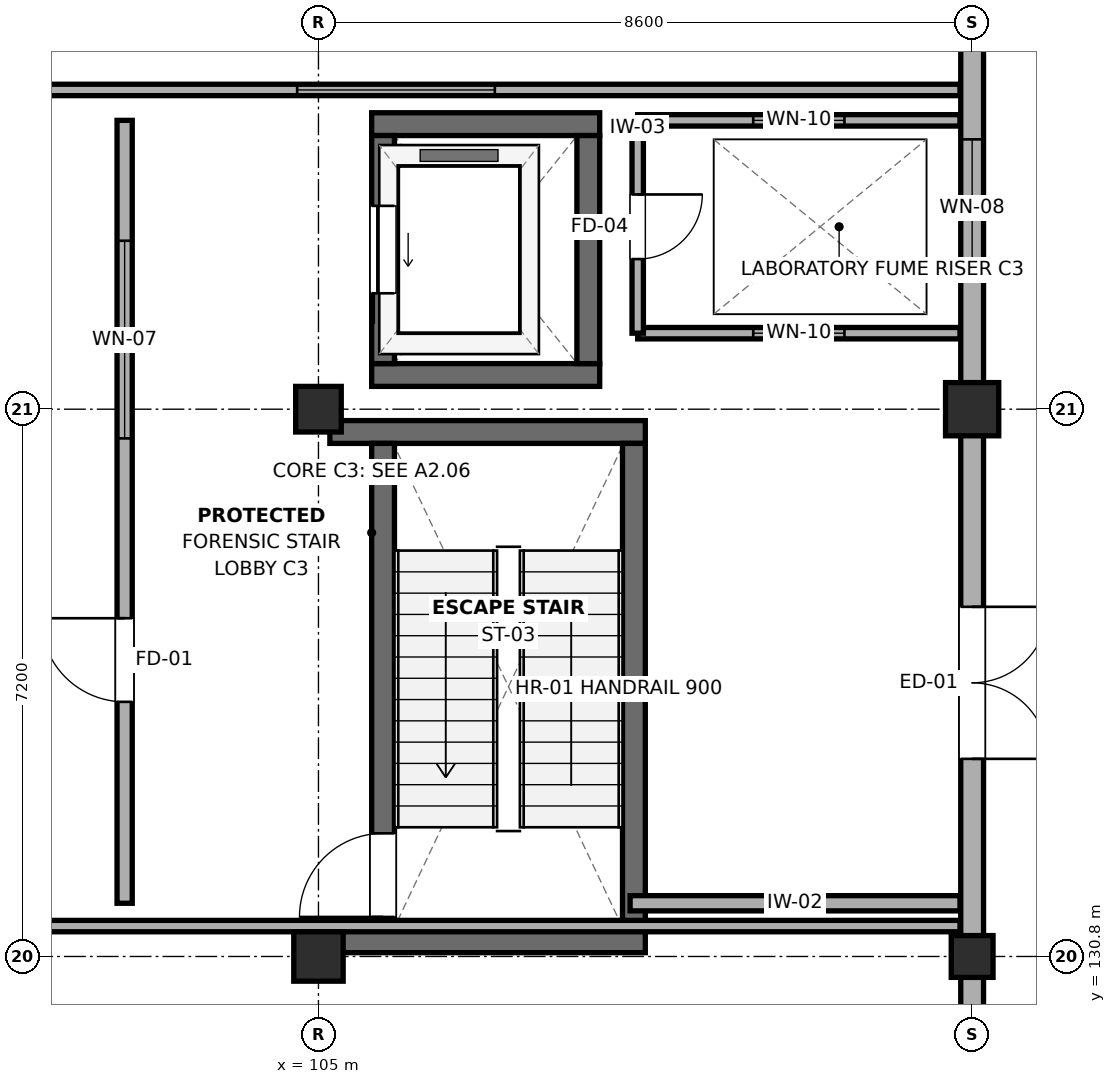
"""IFC4 building model, lengths in metres.
Left out: names, types, materials, properties, quantities, classifications, styles, units other than length and angle.
Written with IfcOpenShell. Run it as: python <this file> out.ifc"""

import sys

from ifc_helpers import new_model, si_unit, direction, frame, frame_2d, origin, origin_2d, place, context, subcontext, project, spatial, rectangle, extrude, element, fill, save


model = new_model("IFC4")
c1 = context("Model", 3, precision=1e-05, world=origin(), true_north=direction((0.0, 1.0)))
c2 = subcontext(c1, "Body", "Model", "MODEL_VIEW")
j1 = project(units=[si_unit("LENGTHUNIT", "METRE"), si_unit("PLANEANGLEUNIT", "RADIAN")], contexts=[c1])
p1 = place(None, origin())
s1 = spatial("IfcSite", under=j1, at=p1, CompositionType="ELEMENT")
p2 = place(p1, origin())
s2 = spatial("IfcBuilding", under=s1, at=p2, CompositionType="ELEMENT")
p3 = place(p2, origin())
s3 = spatial("IfcBuildingStorey", under=s2, at=p3, CompositionType="ELEMENT", Elevation=0.0)
p4 = place(p3, frame((105.0, 130.8, 0.0), z_axis=(0.0, 0.0, 1.0), x_axis=(1.0, 0.0, 0.0)))
e1 = element("IfcColumn", 1, at=p4, inside=s3, PredefinedType="COLUMN", context=c2, shape_type="SweptSolid", body=[
    extrude(rectangle(XDim=0.65, YDim=0.65, at=origin_2d()), origin(), (0.0, 0.0, 1.0), 4.8),
])
p5 = place(p3, frame((105.0, 138.0, 0.0), z_axis=(0.0, 0.0, 1.0), x_axis=(1.0, 0.0, 0.0)))
e2 = element("IfcColumn", 2, at=p5, inside=s3, PredefinedType="COLUMN", context=c2, shape_type="SweptSolid", body=[
    extrude(rectangle(XDim=0.6, YDim=0.6, at=origin_2d()), origin(), (0.0, 0.0, 1.0), 4.8),
])
p6 = place(p3, frame((113.6, 130.8, 0.0), z_axis=(0.0, 0.0, 1.0), x_axis=(1.0, 0.0, 0.0)))
e3 = element("IfcColumn", 3, at=p6, inside=s3, PredefinedType="COLUMN", context=c2, shape_type="SweptSolid", body=[
    extrude(rectangle(XDim=0.55, YDim=0.55, at=origin_2d()), origin(), (0.0, 0.0, 1.0), 4.8),
])
p7 = place(p3, frame((113.6, 138.0, 0.0), z_axis=(0.0, 0.0, 1.0), x_axis=(1.0, 0.0, 0.0)))
e4 = element("IfcColumn", 4, at=p7, inside=s3, PredefinedType="COLUMN", context=c2, shape_type="SweptSolid", body=[
    extrude(rectangle(XDim=0.7, YDim=0.7, at=origin_2d()), origin(), (0.0, 0.0, 1.0), 4.8),
])
for number, where, z_axis, x_axis in (
    (5, (105.15, 131.0, 0.0), (0.0, 0.0, 1.0), (1.0, 0.0, 0.0)),
    (6, (105.15, 137.7, 0.0), (0.0, 0.0, 1.0), (1.0, 0.0, 0.0)),
):
    element("IfcWall", number, at=place(p3, frame(where, z_axis=z_axis, x_axis=x_axis)), inside=s3, PredefinedType="SHEAR", context=c2, shape_type="SweptSolid", body=[
        extrude(rectangle(XDim=4.15, YDim=0.3, at=frame_2d((2.075, 0.0))), origin(), (0.0, 0.0, 1.0), 4.56),
    ])
p8 = place(p3, frame((105.85, 131.15, 0.0), z_axis=(0.0, 0.0, 1.0), x_axis=(0.0, 1.0, 0.0)))
e7 = element("IfcWall", 7, at=p8, inside=s3, PredefinedType="SHEAR", context=c2, shape_type="SweptSolid", body=[
    extrude(rectangle(XDim=6.4, YDim=0.3, at=frame_2d((3.2, 0.0))), origin(), (0.0, 0.0, 1.0), 4.56),
])
p9 = place(p8, frame((0.17, 0.0, 0.0)))
e8 = element("IfcOpeningElement", 8, at=p9, cuts=e7, PredefinedType="OPENING", context=c2, shape_type="SweptSolid", body=[
    extrude(rectangle(XDim=1.1, YDim=2.15, at=frame_2d((0.55, 1.075))), frame((0.0, 0.165, 0.0), z_axis=(0.0, -1.0, 0.0), x_axis=(1.0, 0.0, 0.0)), (0.0, 0.0, 1.0), 0.33),
])
p10 = place(p3, frame((109.15, 131.15, 0.0), z_axis=(0.0, 0.0, 1.0), x_axis=(0.0, 1.0, 0.0)))
e9 = element("IfcWall", 9, at=p10, inside=s3, PredefinedType="SHEAR", context=c2, shape_type="SweptSolid", body=[
    extrude(rectangle(XDim=6.4, YDim=0.3, at=frame_2d((3.2, 0.0))), origin(), (0.0, 0.0, 1.0), 4.56),
])
for number, where, z_axis, x_axis in (
    (10, (105.7, 138.45, 0.0), (0.0, 0.0, 1.0), (1.0, 0.0, 0.0)),
    (11, (105.7, 141.75, 0.0), (0.0, 0.0, 1.0), (1.0, 0.0, 0.0)),
):
    element("IfcWall", number, at=place(p3, frame(where, z_axis=z_axis, x_axis=x_axis)), inside=s3, PredefinedType="SHEAR", context=c2, shape_type="SweptSolid", body=[
        extrude(rectangle(XDim=3.0, YDim=0.3, at=frame_2d((1.5, 0.0))), origin(), (0.0, 0.0, 1.0), 4.56),
    ])
p11 = place(p3, frame((105.85, 138.6, 0.0), z_axis=(0.0, 0.0, 1.0), x_axis=(0.0, 1.0, 0.0)))
e12 = element("IfcWall", 12, at=p11, inside=s3, PredefinedType="SHEAR", context=c2, shape_type="SweptSolid", body=[
    extrude(rectangle(XDim=3.0, YDim=0.3, at=frame_2d((1.5, 0.0))), origin(), (0.0, 0.0, 1.0), 4.56),
])
p12 = place(p11, frame((0.925, 0.0, 0.0)))
e13 = element("IfcOpeningElement", 13, at=p12, cuts=e12, PredefinedType="OPENING", context=c2, shape_type="SweptSolid", body=[
    extrude(rectangle(XDim=1.15, YDim=2.15, at=frame_2d((0.575, 1.075))), frame((0.0, 0.165, 0.0), z_axis=(0.0, -1.0, 0.0), x_axis=(1.0, 0.0, 0.0)), (0.0, 0.0, 1.0), 0.33),
])
p13 = place(p3, frame((108.55, 138.6, 0.0), z_axis=(0.0, 0.0, 1.0), x_axis=(0.0, 1.0, 0.0)))
e14 = element("IfcWall", 14, at=p13, inside=s3, PredefinedType="SHEAR", context=c2, shape_type="SweptSolid", body=[
    extrude(rectangle(XDim=3.0, YDim=0.3, at=frame_2d((1.5, 0.0))), origin(), (0.0, 0.0, 1.0), 4.56),
])
p14 = place(p3, frame((113.6, 122.4, 0.0), z_axis=(0.0, 0.0, 1.0), x_axis=(0.0, 1.0, 0.0)))
e15 = element("IfcWall", 15, at=p14, inside=s3, PredefinedType="SOLIDWALL", context=c2, shape_type="SweptSolid", body=[
    extrude(rectangle(XDim=8.4, YDim=0.3, at=frame_2d((4.2, 0.0))), origin(), (0.0, 0.0, 1.0), 3.965),
])
p15 = place(p14, frame((1.352, 0.0, 1.1)))
e16 = element("IfcOpeningElement", 16, at=p15, cuts=e15, PredefinedType="OPENING", context=c2, shape_type="SweptSolid", body=[
    extrude(rectangle(XDim=2.0, YDim=1.8, at=frame_2d((1.0, 0.9))), frame((0.0, 0.165, 0.0), z_axis=(0.0, -1.0, 0.0), x_axis=(1.0, 0.0, 0.0)), (0.0, 0.0, 1.0), 0.33),
])
p16 = place(p14, frame((5.048, 0.0, 1.1)))
e17 = element("IfcOpeningElement", 17, at=p16, cuts=e15, PredefinedType="OPENING", context=c2, shape_type="SweptSolid", body=[
    extrude(rectangle(XDim=2.0, YDim=1.8, at=frame_2d((1.0, 0.9))), frame((0.0, 0.165, 0.0), z_axis=(0.0, -1.0, 0.0), x_axis=(1.0, 0.0, 0.0)), (0.0, 0.0, 1.0), 0.33),
])
p17 = place(p3, frame((113.6, 130.8, 0.0), z_axis=(0.0, 0.0, 1.0), x_axis=(0.0, 1.0, 0.0)))
e18 = element("IfcWall", 18, at=p17, inside=s3, PredefinedType="SOLIDWALL", context=c2, shape_type="SweptSolid", body=[
    extrude(rectangle(XDim=7.2, YDim=0.3, at=frame_2d((3.6, 0.0))), origin(), (0.0, 0.0, 1.0), 3.965),
])
p18 = place(p17, frame((2.6, 0.0, 0.0)))
e19 = element("IfcOpeningElement", 19, at=p18, cuts=e18, PredefinedType="OPENING", context=c2, shape_type="SweptSolid", body=[
    extrude(rectangle(XDim=2.0, YDim=2.25, at=frame_2d((1.0, 1.125))), frame((0.0, 0.165, 0.0), z_axis=(0.0, -1.0, 0.0), x_axis=(1.0, 0.0, 0.0)), (0.0, 0.0, 1.0), 0.33),
])
p19 = place(p3, frame((113.6, 138.0, 0.0), z_axis=(0.0, 0.0, 1.0), x_axis=(0.0, 1.0, 0.0)))
e20 = element("IfcWall", 20, at=p19, inside=s3, PredefinedType="SOLIDWALL", context=c2, shape_type="SweptSolid", body=[
    extrude(rectangle(XDim=7.2, YDim=0.3, at=frame_2d((3.6, 0.0))), origin(), (0.0, 0.0, 1.0), 3.955),
])
p20 = place(p19, frame((1.75, 0.0, 1.1)))
e21 = element("IfcOpeningElement", 21, at=p20, cuts=e20, PredefinedType="OPENING", context=c2, shape_type="SweptSolid", body=[
    extrude(rectangle(XDim=1.8, YDim=1.2, at=frame_2d((0.9, 0.6))), frame((0.0, 0.165, 0.0), z_axis=(0.0, -1.0, 0.0), x_axis=(1.0, 0.0, 0.0)), (0.0, 0.0, 1.0), 0.33),
])
p21 = place(p3, frame((102.45, 131.5, 0.0), z_axis=(0.0, 0.0, 1.0), x_axis=(0.0, 1.0, 0.0)))
e22 = element("IfcWall", 22, at=p21, inside=s3, PredefinedType="PARTITIONING", context=c2, shape_type="SweptSolid", body=[
    extrude(rectangle(XDim=10.3, YDim=0.2, at=frame_2d((5.15, 0.0))), origin(), (0.0, 0.0, 1.0), 4.205),
])
p22 = place(p21, frame((2.65, 0.0, 0.0)))
e23 = element("IfcOpeningElement", 23, at=p22, cuts=e22, PredefinedType="OPENING", context=c2, shape_type="SweptSolid", body=[
    extrude(rectangle(XDim=1.1, YDim=2.15, at=frame_2d((0.55, 1.075))), frame((0.0, 0.115, 0.0), z_axis=(0.0, -1.0, 0.0), x_axis=(1.0, 0.0, 0.0)), (0.0, 0.0, 1.0), 0.23),
])
p23 = place(p21, frame((6.116, 0.0, 0.95)))
e24 = element("IfcOpeningElement", 24, at=p23, cuts=e22, PredefinedType="OPENING", context=c2, shape_type="SweptSolid", body=[
    extrude(rectangle(XDim=2.6, YDim=1.5, at=frame_2d((1.3, 0.75))), frame((0.0, 0.115, 0.0), z_axis=(0.0, -1.0, 0.0), x_axis=(1.0, 0.0, 0.0)), (0.0, 0.0, 1.0), 0.23),
])
p24 = place(p3, frame((109.1, 131.5, 0.0), z_axis=(0.0, 0.0, 1.0), x_axis=(1.0, 0.0, 0.0)))
e25 = element("IfcWall", 25, at=p24, inside=s3, PredefinedType="PARTITIONING", context=c2, shape_type="SweptSolid", body=[
    extrude(rectangle(XDim=4.34, YDim=0.2, at=frame_2d((2.17, 0.0))), origin(), (0.0, 0.0, 1.0), 4.225),
])
p25 = place(p3, frame((109.2, 139.0, 0.0), z_axis=(0.0, 0.0, 1.0), x_axis=(1.0, 0.0, 0.0)))
e26 = element("IfcWall", 26, at=p25, inside=s3, PredefinedType="PARTITIONING", context=c2, shape_type="SweptSolid", body=[
    extrude(rectangle(XDim=4.24, YDim=0.15, at=frame_2d((2.12, 0.0))), origin(), (0.0, 0.0, 1.0), 3.955),
])
p26 = place(p25, frame((1.52, 0.0, 0.95)))
e27 = element("IfcOpeningElement", 27, at=p26, cuts=e26, PredefinedType="OPENING", context=c2, shape_type="SweptSolid", body=[
    extrude(rectangle(XDim=1.2, YDim=1.5, at=frame_2d((0.6, 0.75))), frame((0.0, 0.09, 0.0), z_axis=(0.0, -1.0, 0.0), x_axis=(1.0, 0.0, 0.0)), (0.0, 0.0, 1.0), 0.18),
])
p27 = place(p3, frame((109.2, 141.8, 0.0), z_axis=(0.0, 0.0, 1.0), x_axis=(1.0, 0.0, 0.0)))
e28 = element("IfcWall", 28, at=p27, inside=s3, PredefinedType="PARTITIONING", context=c2, shape_type="SweptSolid", body=[
    extrude(rectangle(XDim=4.24, YDim=0.15, at=frame_2d((2.12, 0.0))), origin(), (0.0, 0.0, 1.0), 3.955),
])
p28 = place(p27, frame((1.52, 0.0, 0.95)))
e29 = element("IfcOpeningElement", 29, at=p28, cuts=e28, PredefinedType="OPENING", context=c2, shape_type="SweptSolid", body=[
    extrude(rectangle(XDim=1.2, YDim=1.5, at=frame_2d((0.6, 0.75))), frame((0.0, 0.09, 0.0), z_axis=(0.0, -1.0, 0.0), x_axis=(1.0, 0.0, 0.0)), (0.0, 0.0, 1.0), 0.18),
])
p29 = place(p3, frame((109.2, 139.0, 0.0), z_axis=(0.0, 0.0, 1.0), x_axis=(0.0, 1.0, 0.0)))
e30 = element("IfcWall", 30, at=p29, inside=s3, PredefinedType="PARTITIONING", context=c2, shape_type="SweptSolid", body=[
    extrude(rectangle(XDim=2.8, YDim=0.15, at=frame_2d((1.4, 0.0))), origin(), (0.0, 0.0, 1.0), 4.555),
])
p30 = place(p29, frame((0.975, 0.0, 0.0)))
e31 = element("IfcOpeningElement", 31, at=p30, cuts=e30, PredefinedType="OPENING", context=c2, shape_type="SweptSolid", body=[
    extrude(rectangle(XDim=0.85, YDim=2.1, at=frame_2d((0.425, 1.05))), frame((0.0, 0.09, 0.0), z_axis=(0.0, -1.0, 0.0), x_axis=(1.0, 0.0, 0.0)), (0.0, 0.0, 1.0), 0.18),
])
p31 = place(p3, frame((98.6, 131.2, 0.0), z_axis=(0.0, 0.0, 1.0), x_axis=(1.0, 0.0, 0.0)))
e32 = element("IfcWall", 32, at=p31, inside=s3, PredefinedType="PARTITIONING", context=c2, shape_type="SweptSolid", body=[
    extrude(rectangle(XDim=14.84, YDim=0.15, at=frame_2d((7.42, 0.0))), origin(), (0.0, 0.0, 1.0), 4.055),
])
p32 = place(p3, frame((98.6, 142.2, 0.0), z_axis=(0.0, 0.0, 1.0), x_axis=(1.0, 0.0, 0.0)))
e33 = element("IfcWall", 33, at=p32, inside=s3, PredefinedType="PARTITIONING", context=c2, shape_type="SweptSolid", body=[
    extrude(rectangle(XDim=14.84, YDim=0.15, at=frame_2d((7.42, 0.0))), origin(), (0.0, 0.0, 1.0), 3.955),
])
p33 = place(p32, frame((6.12, 0.0, 0.95)))
e34 = element("IfcOpeningElement", 34, at=p33, cuts=e33, PredefinedType="OPENING", context=c2, shape_type="SweptSolid", body=[
    extrude(rectangle(XDim=2.6, YDim=1.5, at=frame_2d((1.3, 0.75))), frame((0.0, 0.09, 0.0), z_axis=(0.0, -1.0, 0.0), x_axis=(1.0, 0.0, 0.0)), (0.0, 0.0, 1.0), 0.18),
])
p34 = place(p18, frame((2.0, 0.0, 0.0), z_axis=(0.0, 0.0, 1.0), x_axis=(-1.0, 0.0, 0.0)))
e35 = element("IfcDoor", 35, at=p34, inside=s3, OperationType="DOUBLE_DOOR_SINGLE_SWING", PredefinedType="DOOR", context=c2, shape_type="SweptSolid", body=[
    extrude(rectangle(XDim=2.0, YDim=2.25, at=frame_2d((1.0, 1.125))), frame((0.0, 0.025, 0.0), z_axis=(0.0, -1.0, 0.0), x_axis=(1.0, 0.0, 0.0)), (0.0, 0.0, 1.0), 0.05),
])
fill(e19, e35)
p35 = place(p20, origin())
e36 = element("IfcWindow", 36, at=p35, inside=s3, PartitioningType="SINGLE_PANEL", PredefinedType="WINDOW", context=c2, shape_type="SweptSolid", body=[
    extrude(rectangle(XDim=1.8, YDim=1.2, at=frame_2d((0.9, 0.6))), frame((0.0, 0.03, 0.0), z_axis=(0.0, -1.0, 0.0), x_axis=(1.0, 0.0, 0.0)), (0.0, 0.0, 1.0), 0.06),
])
fill(e21, e36)
p36 = place(p9, origin())
e37 = element("IfcDoor", 37, at=p36, inside=s3, OperationType="SINGLE_SWING_LEFT", PredefinedType="DOOR", context=c2, shape_type="SweptSolid", body=[
    extrude(rectangle(XDim=1.1, YDim=2.15, at=frame_2d((0.55, 1.075))), frame((0.0, 0.025, 0.0), z_axis=(0.0, -1.0, 0.0), x_axis=(1.0, 0.0, 0.0)), (0.0, 0.0, 1.0), 0.05),
])
fill(e8, e37)
p37 = place(p12, origin())
e38 = element("IfcDoor", 38, at=p37, inside=s3, OperationType="SLIDING_TO_LEFT", PredefinedType="DOOR", context=c2, shape_type="SweptSolid", body=[
    extrude(rectangle(XDim=1.15, YDim=2.15, at=frame_2d((0.575, 1.075))), frame((0.0, 0.025, 0.0), z_axis=(0.0, -1.0, 0.0), x_axis=(1.0, 0.0, 0.0)), (0.0, 0.0, 1.0), 0.05),
])
fill(e13, e38)
p38 = place(p22, origin())
e39 = element("IfcDoor", 39, at=p38, inside=s3, OperationType="SINGLE_SWING_RIGHT", PredefinedType="DOOR", context=c2, shape_type="SweptSolid", body=[
    extrude(rectangle(XDim=1.1, YDim=2.15, at=frame_2d((0.55, 1.075))), frame((0.0, 0.025, 0.0), z_axis=(0.0, -1.0, 0.0), x_axis=(1.0, 0.0, 0.0)), (0.0, 0.0, 1.0), 0.05),
])
fill(e23, e39)
p39 = place(p23, origin())
e40 = element("IfcWindow", 40, at=p39, inside=s3, PartitioningType="SINGLE_PANEL", PredefinedType="WINDOW", context=c2, shape_type="SweptSolid", body=[
    extrude(rectangle(XDim=2.6, YDim=1.5, at=frame_2d((1.3, 0.75))), frame((0.0, 0.03, 0.0), z_axis=(0.0, -1.0, 0.0), x_axis=(1.0, 0.0, 0.0)), (0.0, 0.0, 1.0), 0.06),
])
fill(e24, e40)
p40 = place(p26, origin())
e41 = element("IfcWindow", 41, at=p40, inside=s3, PartitioningType="SINGLE_PANEL", PredefinedType="WINDOW", context=c2, shape_type="SweptSolid", body=[
    extrude(rectangle(XDim=1.2, YDim=1.5, at=frame_2d((0.6, 0.75))), frame((0.0, 0.03, 0.0), z_axis=(0.0, -1.0, 0.0), x_axis=(1.0, 0.0, 0.0)), (0.0, 0.0, 1.0), 0.06),
])
fill(e27, e41)
p41 = place(p28, origin())
e42 = element("IfcWindow", 42, at=p41, inside=s3, PartitioningType="SINGLE_PANEL", PredefinedType="WINDOW", context=c2, shape_type="SweptSolid", body=[
    extrude(rectangle(XDim=1.2, YDim=1.5, at=frame_2d((0.6, 0.75))), frame((0.0, 0.03, 0.0), z_axis=(0.0, -1.0, 0.0), x_axis=(1.0, 0.0, 0.0)), (0.0, 0.0, 1.0), 0.06),
])
fill(e29, e42)
p42 = place(p30, frame((0.85, 0.0, 0.0), z_axis=(0.0, 0.0, 1.0), x_axis=(-1.0, 0.0, 0.0)))
e43 = element("IfcDoor", 43, at=p42, inside=s3, OperationType="SINGLE_SWING_LEFT", PredefinedType="DOOR", context=c2, shape_type="SweptSolid", body=[
    extrude(rectangle(XDim=0.85, YDim=2.1, at=frame_2d((0.425, 1.05))), frame((0.0, 0.025, 0.0), z_axis=(0.0, -1.0, 0.0), x_axis=(1.0, 0.0, 0.0)), (0.0, 0.0, 1.0), 0.05),
])
fill(e31, e43)
p43 = place(p33, origin())
e44 = element("IfcWindow", 44, at=p43, inside=s3, PartitioningType="SINGLE_PANEL", PredefinedType="WINDOW", context=c2, shape_type="SweptSolid", body=[
    extrude(rectangle(XDim=2.6, YDim=1.5, at=frame_2d((1.3, 0.75))), frame((0.0, 0.03, 0.0), z_axis=(0.0, -1.0, 0.0), x_axis=(1.0, 0.0, 0.0)), (0.0, 0.0, 1.0), 0.06),
])
fill(e34, e44)
save(model, sys.argv[1])
